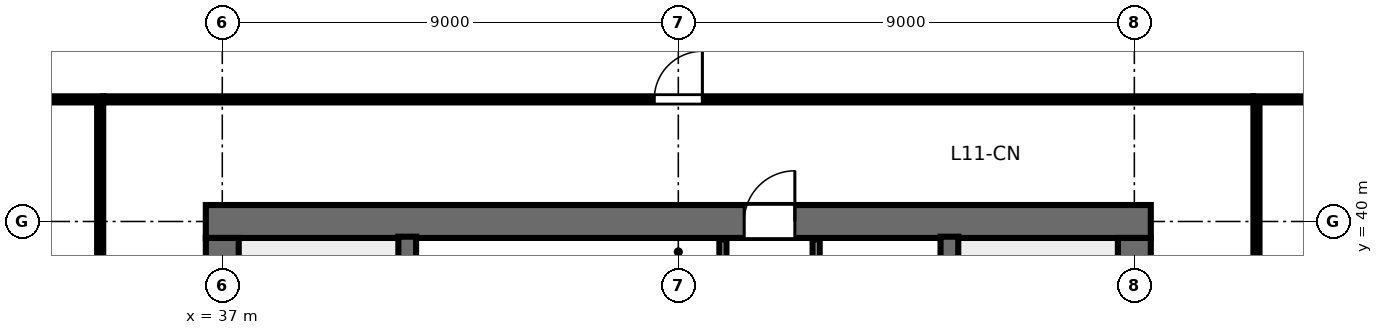
"""IFC4 building model, lengths in metres.
Left out: names, types, materials, properties, quantities, classifications, styles, units other than length and angle.
Written with IfcOpenShell. Run it as: python <this file> out.ifc"""

import sys

from ifc_helpers import new_model, si_unit, direction, frame, frame_2d, origin, place, context, subcontext, project, spatial, rectangle, extrude, element, fill, save


model = new_model("IFC4")
c1 = context("Model", 3, precision=1e-05, world=origin(), true_north=direction((0.0, 1.0)))
c2 = subcontext(c1, "Body", "Model", "MODEL_VIEW")
j1 = project(units=[si_unit("LENGTHUNIT", "METRE"), si_unit("PLANEANGLEUNIT", "RADIAN")], contexts=[c1])
p1 = place(None, origin())
s1 = spatial("IfcSite", under=j1, at=p1, CompositionType="ELEMENT")
p2 = place(p1, origin())
s2 = spatial("IfcBuilding", under=s1, at=p2, CompositionType="ELEMENT")
p3 = place(p2, frame((0.0, 0.0, 46.0)))
s3 = spatial("IfcBuildingStorey", under=s2, at=p3, CompositionType="ELEMENT", Elevation=46.0)
p4 = place(p3, frame((36.675, 40.0, 0.0), z_axis=(0.0, 0.0, 1.0), x_axis=(1.0, 0.0, 0.0)))
e1 = element("IfcWall", 1, at=p4, inside=s3, PredefinedType="SHEAR", context=c2, shape_type="SweptSolid", body=[
    extrude(rectangle(XDim=18.65, YDim=0.65, at=frame_2d((9.325, 0.0))), origin(), (0.0, 0.0, 1.0), 3.36),
])
p5 = place(p4, frame((10.625, 0.0, 0.0)))
e2 = element("IfcOpeningElement", 2, at=p5, cuts=e1, PredefinedType="OPENING", context=c2, shape_type="SweptSolid", body=[
    extrude(rectangle(XDim=1.0, YDim=2.15, at=frame_2d((0.5, 1.075))), frame((0.0, 0.335, 0.0), z_axis=(0.0, -1.0, 0.0), x_axis=(1.0, 0.0, 0.0)), (0.0, 0.0, 1.0), 0.67),
])
p6 = place(p3, frame((37.0, 24.325, 0.0), z_axis=(0.0, 0.0, 1.0), x_axis=(0.0, 1.0, 0.0)))
e3 = element("IfcWall", 3, at=p6, inside=s3, PredefinedType="SHEAR", context=c2, shape_type="SweptSolid", body=[
    extrude(rectangle(XDim=15.35, YDim=0.65, at=frame_2d((7.675, 0.0))), origin(), (0.0, 0.0, 1.0), 3.36),
])
p7 = place(p6, frame((5.2, 0.0, 0.0)))
e4 = element("IfcOpeningElement", 4, at=p7, cuts=e3, PredefinedType="OPENING", context=c2, shape_type="SweptSolid", body=[
    extrude(rectangle(XDim=1.15, YDim=2.15, at=frame_2d((0.575, 1.075))), frame((0.0, 0.335, 0.0), z_axis=(0.0, -1.0, 0.0), x_axis=(1.0, 0.0, 0.0)), (0.0, 0.0, 1.0), 0.67),
])
p8 = place(p3, frame((55.0, 24.325, 0.0), z_axis=(0.0, 0.0, 1.0), x_axis=(0.0, 1.0, 0.0)))
e5 = element("IfcWall", 5, at=p8, inside=s3, PredefinedType="SHEAR", context=c2, shape_type="SweptSolid", body=[
    extrude(rectangle(XDim=15.35, YDim=0.65, at=frame_2d((7.675, 0.0))), origin(), (0.0, 0.0, 1.0), 3.36),
])
p9 = place(p8, frame((5.2, 0.0, 0.0)))
e6 = element("IfcOpeningElement", 6, at=p9, cuts=e5, PredefinedType="OPENING", context=c2, shape_type="SweptSolid", body=[
    extrude(rectangle(XDim=1.15, YDim=2.15, at=frame_2d((0.575, 1.075))), frame((0.0, 0.335, 0.0), z_axis=(0.0, -1.0, 0.0), x_axis=(1.0, 0.0, 0.0)), (0.0, 0.0, 1.0), 0.67),
])
for number, where, z_axis, x_axis in (
    (7, (40.65, 32.0, 0.0), (0.0, 0.0, 1.0), (0.0, 1.0, 0.0)),
    (8, (51.35, 32.0, 0.0), (0.0, 0.0, 1.0), (0.0, 1.0, 0.0)),
):
    element("IfcWall", number, at=place(p3, frame(where, z_axis=z_axis, x_axis=x_axis)), inside=s3, PredefinedType="SHEAR", context=c2, shape_type="SweptSolid", body=[
        extrude(rectangle(XDim=7.7, YDim=0.35, at=frame_2d((3.85, 0.0))), origin(), (0.0, 0.0, 1.0), 3.6),
    ])
p10 = place(p3, frame((46.88, 32.05, 0.0), z_axis=(0.0, 0.0, 1.0), x_axis=(0.0, 1.0, 0.0)))
e9 = element("IfcWall", 9, at=p10, inside=s3, PredefinedType="PARTITIONING", context=c2, shape_type="SweptSolid", body=[
    extrude(rectangle(XDim=7.6, YDim=0.14, at=frame_2d((3.8, 0.0))), origin(), (0.0, 0.0, 1.0), 3.15),
])
p11 = place(p10, frame((3.4, 0.0, 0.0)))
e10 = element("IfcOpeningElement", 10, at=p11, cuts=e9, PredefinedType="OPENING", context=c2, shape_type="SweptSolid", body=[
    extrude(rectangle(XDim=0.95, YDim=2.15, at=frame_2d((0.475, 1.075))), frame((0.0, 0.08, 0.0), z_axis=(0.0, -1.0, 0.0), x_axis=(1.0, 0.0, 0.0)), (0.0, 0.0, 1.0), 0.16),
])
p12 = place(p3, frame((48.72, 32.05, 0.0), z_axis=(0.0, 0.0, 1.0), x_axis=(0.0, 1.0, 0.0)))
e11 = element("IfcWall", 11, at=p12, inside=s3, PredefinedType="PARTITIONING", context=c2, shape_type="SweptSolid", body=[
    extrude(rectangle(XDim=7.6, YDim=0.14, at=frame_2d((3.8, 0.0))), origin(), (0.0, 0.0, 1.0), 3.15),
])
p13 = place(p12, frame((0.8, 0.0, 0.0)))
e12 = element("IfcOpeningElement", 12, at=p13, cuts=e11, PredefinedType="OPENING", context=c2, shape_type="SweptSolid", body=[
    extrude(rectangle(XDim=0.9, YDim=2.15, at=frame_2d((0.45, 1.075))), frame((0.0, 0.08, 0.0), z_axis=(0.0, -1.0, 0.0), x_axis=(1.0, 0.0, 0.0)), (0.0, 0.0, 1.0), 0.16),
])
p14 = place(p12, frame((3.35, 0.0, 0.0)))
e13 = element("IfcOpeningElement", 13, at=p14, cuts=e11, PredefinedType="OPENING", context=c2, shape_type="SweptSolid", body=[
    extrude(rectangle(XDim=0.9, YDim=2.15, at=frame_2d((0.45, 1.075))), frame((0.0, 0.08, 0.0), z_axis=(0.0, -1.0, 0.0), x_axis=(1.0, 0.0, 0.0)), (0.0, 0.0, 1.0), 0.16),
])
p15 = place(p12, frame((5.9, 0.0, 0.0)))
e14 = element("IfcOpeningElement", 14, at=p15, cuts=e11, PredefinedType="OPENING", context=c2, shape_type="SweptSolid", body=[
    extrude(rectangle(XDim=0.92, YDim=2.15, at=frame_2d((0.46, 1.075))), frame((0.0, 0.08, 0.0), z_axis=(0.0, -1.0, 0.0), x_axis=(1.0, 0.0, 0.0)), (0.0, 0.0, 1.0), 0.16),
])
p16 = place(p3, frame((34.65, 42.41, 0.0), z_axis=(0.0, 0.0, 1.0), x_axis=(1.0, 0.0, 0.0)))
e15 = element("IfcWall", 15, at=p16, inside=s3, PredefinedType="PARTITIONING", context=c2, shape_type="SweptSolid", body=[
    extrude(rectangle(XDim=22.7, YDim=0.12, at=frame_2d((11.35, 0.0))), origin(), (0.0, 0.0, 1.0), 2.43),
])
p17 = place(p16, frame((10.875, 0.0, 0.0)))
e16 = element("IfcOpeningElement", 16, at=p17, cuts=e15, PredefinedType="OPENING", context=c2, shape_type="SweptSolid", body=[
    extrude(rectangle(XDim=0.95, YDim=2.15, at=frame_2d((0.475, 1.075))), frame((0.0, 0.07, 0.0), z_axis=(0.0, -1.0, 0.0), x_axis=(1.0, 0.0, 0.0)), (0.0, 0.0, 1.0), 0.14),
])
p18 = place(p3, frame((34.59, 21.65, 0.0), z_axis=(0.0, 0.0, 1.0), x_axis=(0.0, 1.0, 0.0)))
e17 = element("IfcWall", 17, at=p18, inside=s3, PredefinedType="PARTITIONING", context=c2, shape_type="SweptSolid", body=[
    extrude(rectangle(XDim=20.7, YDim=0.12, at=frame_2d((10.35, 0.0))), origin(), (0.0, 0.0, 1.0), 2.43),
])
p19 = place(p18, frame((3.402, 0.0, 0.0)))
e18 = element("IfcOpeningElement", 18, at=p19, cuts=e17, PredefinedType="OPENING", context=c2, shape_type="SweptSolid", body=[
    extrude(rectangle(XDim=0.95, YDim=2.15, at=frame_2d((0.475, 1.075))), frame((0.0, 0.07, 0.0), z_axis=(0.0, -1.0, 0.0), x_axis=(1.0, 0.0, 0.0)), (0.0, 0.0, 1.0), 0.14),
])
p20 = place(p18, frame((9.912, 0.0, 0.0)))
e19 = element("IfcOpeningElement", 19, at=p20, cuts=e17, PredefinedType="OPENING", context=c2, shape_type="SweptSolid", body=[
    extrude(rectangle(XDim=0.95, YDim=2.15, at=frame_2d((0.475, 1.075))), frame((0.0, 0.07, 0.0), z_axis=(0.0, -1.0, 0.0), x_axis=(1.0, 0.0, 0.0)), (0.0, 0.0, 1.0), 0.14),
])
p21 = place(p18, frame((16.385, 0.0, 0.0)))
e20 = element("IfcOpeningElement", 20, at=p21, cuts=e17, PredefinedType="OPENING", context=c2, shape_type="SweptSolid", body=[
    extrude(rectangle(XDim=0.95, YDim=2.15, at=frame_2d((0.475, 1.075))), frame((0.0, 0.07, 0.0), z_axis=(0.0, -1.0, 0.0), x_axis=(1.0, 0.0, 0.0)), (0.0, 0.0, 1.0), 0.14),
])
p22 = place(p3, frame((57.41, 21.65, 0.0), z_axis=(0.0, 0.0, 1.0), x_axis=(0.0, 1.0, 0.0)))
e21 = element("IfcWall", 21, at=p22, inside=s3, PredefinedType="PARTITIONING", context=c2, shape_type="SweptSolid", body=[
    extrude(rectangle(XDim=20.7, YDim=0.12, at=frame_2d((10.35, 0.0))), origin(), (0.0, 0.0, 1.0), 2.43),
])
p23 = place(p22, frame((9.875, 0.0, 0.0)))
e22 = element("IfcOpeningElement", 22, at=p23, cuts=e21, PredefinedType="OPENING", context=c2, shape_type="SweptSolid", body=[
    extrude(rectangle(XDim=0.95, YDim=2.15, at=frame_2d((0.475, 1.075))), frame((0.0, 0.07, 0.0), z_axis=(0.0, -1.0, 0.0), x_axis=(1.0, 0.0, 0.0)), (0.0, 0.0, 1.0), 0.14),
])
for number, where, z_axis, x_axis in (
    (23, (34.65, 42.41, 0.0), (0.0, 0.0, 1.0), (-1.0, 0.0, 0.0)),
    (24, (57.35, 42.41, 0.0), (0.0, 0.0, 1.0), (1.0, 0.0, 0.0)),
):
    element("IfcWall", number, at=place(p3, frame(where, z_axis=z_axis, x_axis=x_axis)), inside=s3, PredefinedType="PARTITIONING", context=c2, shape_type="SweptSolid", body=[
        extrude(rectangle(XDim=12.42, YDim=0.12, at=frame_2d((6.21, 0.0))), origin(), (0.0, 0.0, 1.0), 2.43),
    ])
p24 = place(p5, origin())
e25 = element("IfcDoor", 25, at=p24, inside=s3, OperationType="SINGLE_SWING_RIGHT", PredefinedType="DOOR", context=c2, shape_type="SweptSolid", body=[
    extrude(rectangle(XDim=1.0, YDim=2.15, at=frame_2d((0.5, 1.075))), frame((0.0, 0.025, 0.0), z_axis=(0.0, -1.0, 0.0), x_axis=(1.0, 0.0, 0.0)), (0.0, 0.0, 1.0), 0.05),
])
fill(e2, e25)
p25 = place(p17, origin())
e26 = element("IfcDoor", 26, at=p25, inside=s3, OperationType="SINGLE_SWING_RIGHT", PredefinedType="DOOR", context=c2, shape_type="SweptSolid", body=[
    extrude(rectangle(XDim=0.95, YDim=2.15, at=frame_2d((0.475, 1.075))), frame((0.0, 0.025, 0.0), z_axis=(0.0, -1.0, 0.0), x_axis=(1.0, 0.0, 0.0)), (0.0, 0.0, 1.0), 0.05),
])
fill(e16, e26)
save(model, sys.argv[1])
